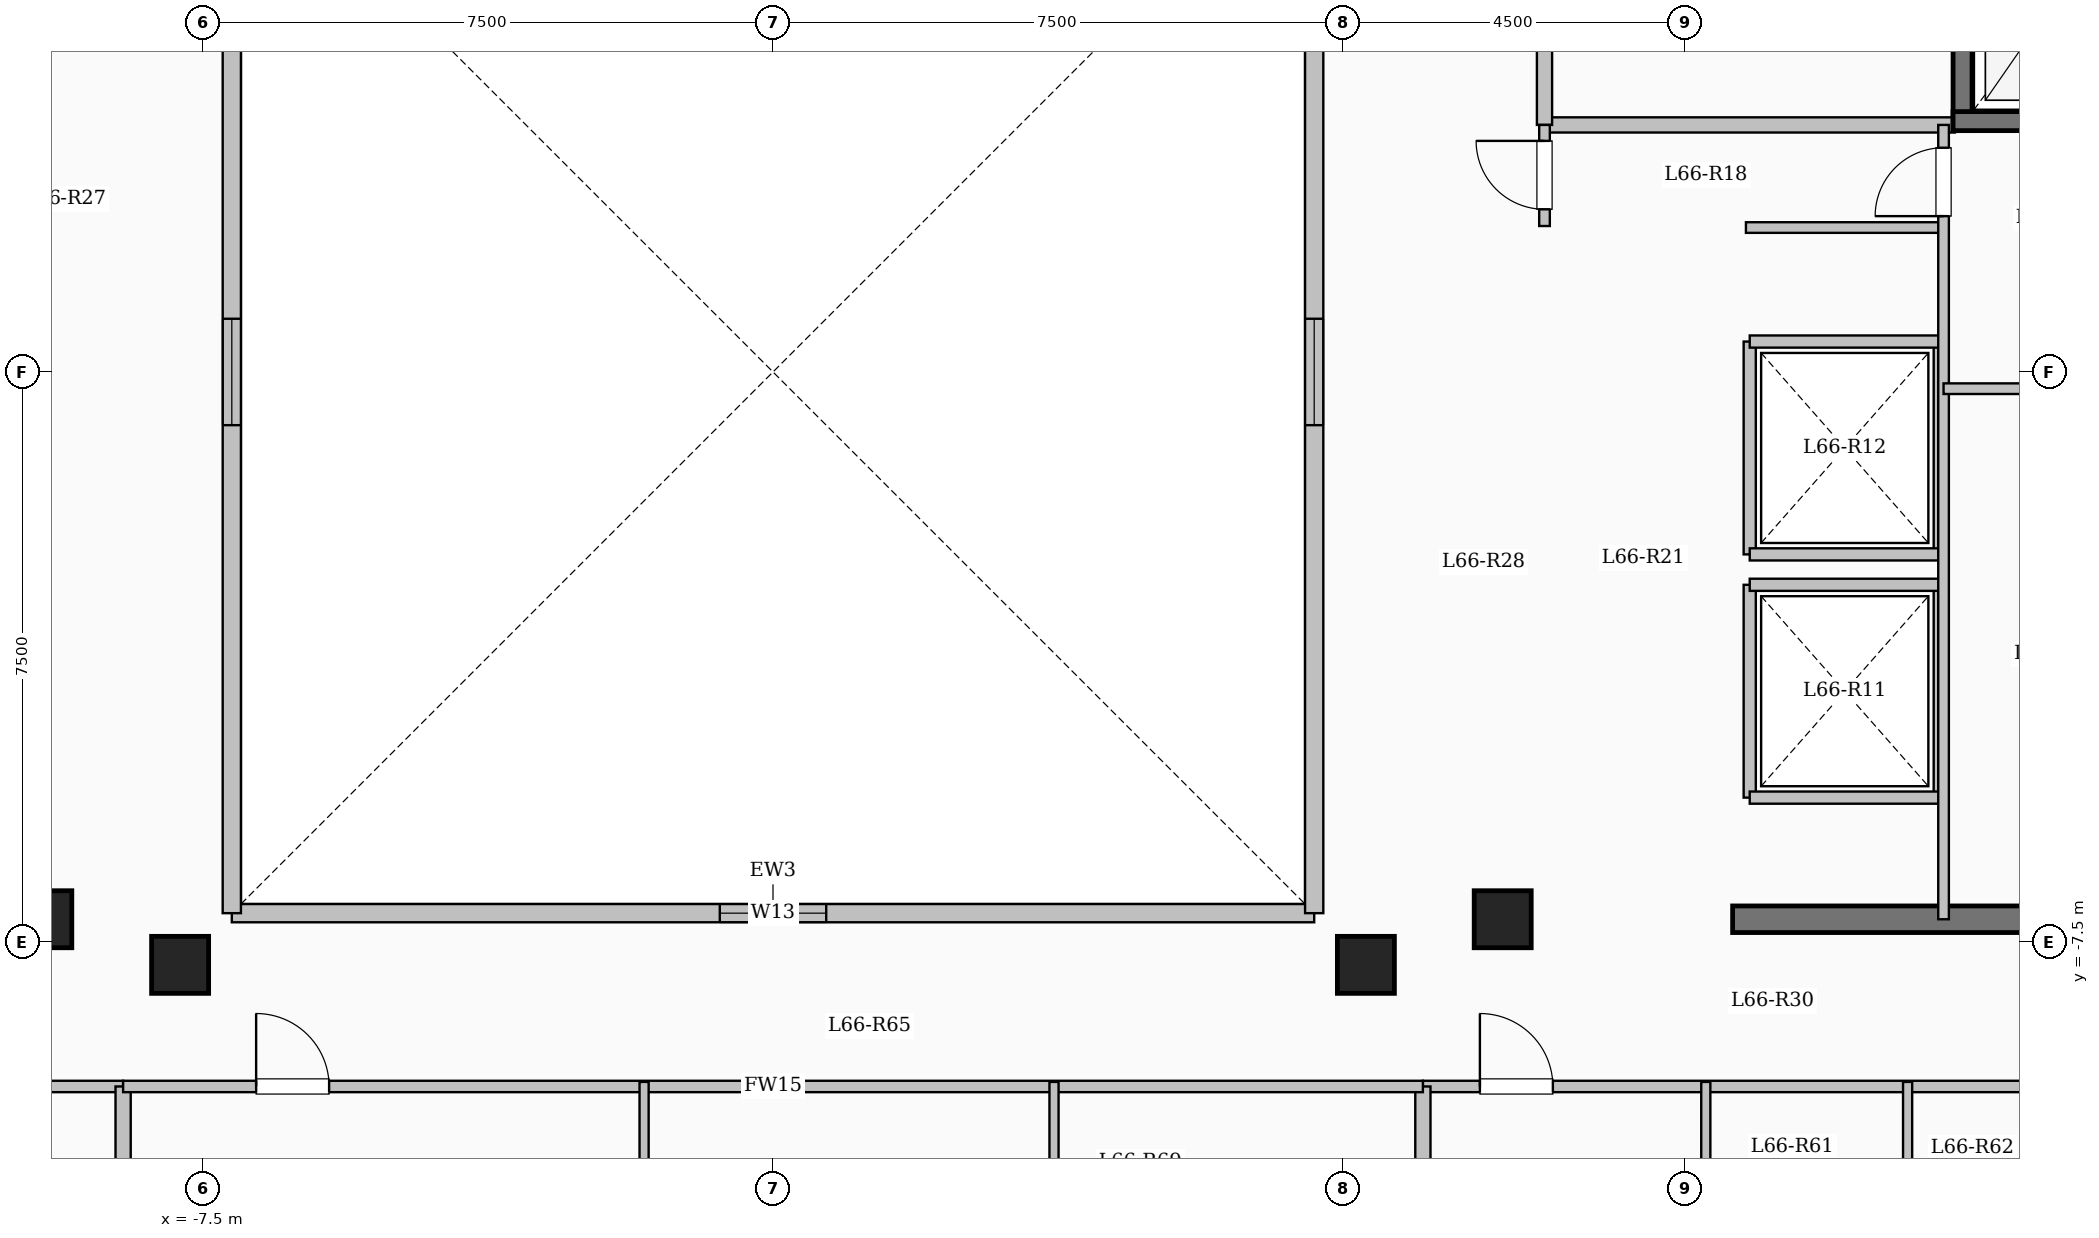
"""IFC4 building model, lengths in metres.
Left out: names, types, materials, properties, quantities, classifications, styles, units other than length and angle.
Written with IfcOpenShell. Run it as: python <this file> out.ifc"""

import sys

from ifc_helpers import new_model, si_unit, direction, frame, frame_2d, origin, origin_2d, place, context, subcontext, project, spatial, rectangle, extrude, element, fill, save


model = new_model("IFC4")
c1 = context("Model", 3, precision=1e-05, world=origin(), true_north=direction((0.0, 1.0)))
c2 = subcontext(c1, "Body", "Model", "MODEL_VIEW")
j1 = project(units=[si_unit("LENGTHUNIT", "METRE"), si_unit("PLANEANGLEUNIT", "RADIAN")], contexts=[c1])
p1 = place(None, origin())
s1 = spatial("IfcSite", under=j1, at=p1, CompositionType="ELEMENT")
p2 = place(p1, origin())
s2 = spatial("IfcBuilding", under=s1, at=p2, CompositionType="ELEMENT")
p3 = place(p2, frame((0.0, 0.0, 244.85)))
s3 = spatial("IfcBuildingStorey", under=s2, at=p3, CompositionType="ELEMENT", Elevation=244.85)
for number, where, z_axis, x_axis in (
    (1, (-7.8, -7.8, 0.0), (0.0, 0.0, 1.0), (1.0, 0.0, 0.0)),
    (2, (7.8, -7.8, 0.0), (0.0, 0.0, 1.0), (1.0, 0.0, 0.0)),
    (3, (-9.6, -7.2, 0.0), (0.0, 0.0, 1.0), (1.0, 0.0, 0.0)),
    (4, (9.6, -7.2, 0.0), (0.0, 0.0, 1.0), (1.0, 0.0, 0.0)),
):
    element("IfcColumn", number, at=place(p3, frame(where, z_axis=z_axis, x_axis=x_axis)), inside=s3, PredefinedType="COLUMN", context=c2, shape_type="SweptSolid", body=[
        extrude(rectangle(XDim=0.75, YDim=0.75, at=origin_2d()), origin(), (0.0, 0.0, 1.0), 3.35),
    ])
p4 = place(p3, frame((-7.12, -7.12, 0.0), z_axis=(0.0, 0.0, 1.0), x_axis=(1.0, 0.0, 0.0)))
e5 = element("IfcWall", 5, at=p4, inside=s3, PredefinedType="SOLIDWALL", context=c2, shape_type="SweptSolid", body=[
    extrude(rectangle(XDim=14.24, YDim=0.24, at=frame_2d((7.12, 0.0))), origin(), (0.0, 0.0, 1.0), 3.1),
])
p5 = place(p4, frame((6.42, 0.0, 0.95)))
e6 = element("IfcOpeningElement", 6, at=p5, cuts=e5, PredefinedType="OPENING", context=c2, shape_type="SweptSolid", body=[
    extrude(rectangle(XDim=1.4, YDim=1.5, at=frame_2d((0.7, 0.75))), frame((0.0, 0.13, 0.0), z_axis=(0.0, -1.0, 0.0), x_axis=(1.0, 0.0, 0.0)), (0.0, 0.0, 1.0), 0.26),
])
p6 = place(p3, frame((7.12, -7.12, 0.0), z_axis=(0.0, 0.0, 1.0), x_axis=(0.0, 1.0, 0.0)))
e7 = element("IfcWall", 7, at=p6, inside=s3, PredefinedType="SOLIDWALL", context=c2, shape_type="SweptSolid", body=[
    extrude(rectangle(XDim=14.24, YDim=0.24, at=frame_2d((7.12, 0.0))), origin(), (0.0, 0.0, 1.0), 3.1),
])
p7 = place(p6, frame((6.42, 0.0, 0.95)))
e8 = element("IfcOpeningElement", 8, at=p7, cuts=e7, PredefinedType="OPENING", context=c2, shape_type="SweptSolid", body=[
    extrude(rectangle(XDim=1.4, YDim=1.5, at=frame_2d((0.7, 0.75))), frame((0.0, 0.13, 0.0), z_axis=(0.0, -1.0, 0.0), x_axis=(1.0, 0.0, 0.0)), (0.0, 0.0, 1.0), 0.26),
])
p8 = place(p3, frame((-7.12, 7.12, 0.0), z_axis=(0.0, 0.0, 1.0), x_axis=(0.0, -1.0, 0.0)))
e9 = element("IfcWall", 9, at=p8, inside=s3, PredefinedType="SOLIDWALL", context=c2, shape_type="SweptSolid", body=[
    extrude(rectangle(XDim=14.24, YDim=0.24, at=frame_2d((7.12, 0.0))), origin(), (0.0, 0.0, 1.0), 3.1),
])
p9 = place(p8, frame((6.42, 0.0, 0.95)))
e10 = element("IfcOpeningElement", 10, at=p9, cuts=e9, PredefinedType="OPENING", context=c2, shape_type="SweptSolid", body=[
    extrude(rectangle(XDim=1.4, YDim=1.5, at=frame_2d((0.7, 0.75))), frame((0.0, 0.13, 0.0), z_axis=(0.0, -1.0, 0.0), x_axis=(1.0, 0.0, 0.0)), (0.0, 0.0, 1.0), 0.26),
])
p10 = place(p3, frame((10.15, 3.25, 0.0), z_axis=(0.0, 0.0, 1.0), x_axis=(1.0, 0.0, 0.0)))
e11 = element("IfcWall", 11, at=p10, inside=s3, PredefinedType="SOLIDWALL", context=c2, shape_type="SweptSolid", body=[
    extrude(rectangle(XDim=5.4, YDim=0.2, at=frame_2d((2.7, 0.0))), origin(), (0.0, 0.0, 1.0), 3.1),
])
p11 = place(p3, frame((10.15, 3.25, 0.0), z_axis=(0.0, 0.0, 1.0), x_axis=(0.0, 1.0, 0.0)))
e12 = element("IfcWall", 12, at=p11, inside=s3, PredefinedType="SOLIDWALL", context=c2, shape_type="SweptSolid", body=[
    extrude(rectangle(XDim=3.25, YDim=0.2, at=frame_2d((1.625, 0.0))), origin(), (0.0, 0.0, 1.0), 3.1),
])
p12 = place(p11, frame((1.1, 0.0, 0.0)))
e13 = element("IfcOpeningElement", 13, at=p12, cuts=e12, PredefinedType="OPENING", context=c2, shape_type="SweptSolid", body=[
    extrude(rectangle(XDim=1.02, YDim=2.15, at=frame_2d((0.51, 1.075))), frame((0.0, 0.11, 0.0), z_axis=(0.0, -1.0, 0.0), x_axis=(1.0, 0.0, 0.0)), (0.0, 0.0, 1.0), 0.22),
])
p13 = place(p3, frame((15.65, 3.175, 0.0), z_axis=(0.0, 0.0, 1.0), x_axis=(0.0, 1.0, 0.0)))
e14 = element("IfcWall", 14, at=p13, inside=s3, PredefinedType="SHEAR", context=c2, shape_type="SweptSolid", body=[
    extrude(rectangle(XDim=3.25, YDim=0.25, at=frame_2d((1.625, 0.0))), origin(), (0.0, 0.0, 1.0), 3.35),
])
p14 = place(p13, frame((1.075, 0.0, 0.0)))
e15 = element("IfcOpeningElement", 15, at=p14, cuts=e14, PredefinedType="OPENING", context=c2, shape_type="SweptSolid", body=[
    extrude(rectangle(XDim=1.1, YDim=2.15, at=frame_2d((0.55, 1.075))), frame((0.0, 0.135, 0.0), z_axis=(0.0, -1.0, 0.0), x_axis=(1.0, 0.0, 0.0)), (0.0, 0.0, 1.0), 0.27),
])
p15 = place(p3, frame((15.525, 3.3, 0.0), z_axis=(0.0, 0.0, 1.0), x_axis=(1.0, 0.0, 0.0)))
e16 = element("IfcWall", 16, at=p15, inside=s3, PredefinedType="SHEAR", context=c2, shape_type="SweptSolid", body=[
    extrude(rectangle(XDim=2.55, YDim=0.25, at=frame_2d((1.275, 0.0))), origin(), (0.0, 0.0, 1.0), 3.35),
])
for number, where, z_axis, x_axis in (
    (17, (12.85, -5.6, 0.0), (0.0, 0.0, 1.0), (0.0, 1.0, 0.0)),
    (18, (15.35, -5.6, 0.0), (0.0, 0.0, 1.0), (0.0, 1.0, 0.0)),
):
    element("IfcWall", number, at=place(p3, frame(where, z_axis=z_axis, x_axis=x_axis)), inside=s3, PredefinedType="SOLIDWALL", context=c2, shape_type="SweptSolid", body=[
        extrude(rectangle(XDim=2.8, YDim=0.16, at=frame_2d((1.4, 0.0))), origin(), (0.0, 0.0, 1.0), 3.1),
    ])
for number, where, z_axis, x_axis in (
    (19, (12.85, -5.6, 0.0), (0.0, 0.0, 1.0), (1.0, 0.0, 0.0)),
    (20, (12.85, -2.8, 0.0), (0.0, 0.0, 1.0), (1.0, 0.0, 0.0)),
):
    element("IfcWall", number, at=place(p3, frame(where, z_axis=z_axis, x_axis=x_axis)), inside=s3, PredefinedType="SOLIDWALL", context=c2, shape_type="SweptSolid", body=[
        extrude(rectangle(XDim=2.5, YDim=0.16, at=frame_2d((1.25, 0.0))), origin(), (0.0, 0.0, 1.0), 3.1),
    ])
for number, where, z_axis, x_axis in (
    (21, (12.85, -2.4, 0.0), (0.0, 0.0, 1.0), (0.0, 1.0, 0.0)),
    (22, (15.35, -2.4, 0.0), (0.0, 0.0, 1.0), (0.0, 1.0, 0.0)),
):
    element("IfcWall", number, at=place(p3, frame(where, z_axis=z_axis, x_axis=x_axis)), inside=s3, PredefinedType="SOLIDWALL", context=c2, shape_type="SweptSolid", body=[
        extrude(rectangle(XDim=2.8, YDim=0.16, at=frame_2d((1.4, 0.0))), origin(), (0.0, 0.0, 1.0), 3.1),
    ])
for number, where, z_axis, x_axis in (
    (23, (12.85, -2.4, 0.0), (0.0, 0.0, 1.0), (1.0, 0.0, 0.0)),
    (24, (12.85, 0.4, 0.0), (0.0, 0.0, 1.0), (1.0, 0.0, 0.0)),
):
    element("IfcWall", number, at=place(p3, frame(where, z_axis=z_axis, x_axis=x_axis)), inside=s3, PredefinedType="SOLIDWALL", context=c2, shape_type="SweptSolid", body=[
        extrude(rectangle(XDim=2.5, YDim=0.16, at=frame_2d((1.25, 0.0))), origin(), (0.0, 0.0, 1.0), 3.1),
    ])
p16 = place(p3, frame((12.625, -7.2, 0.0), z_axis=(0.0, 0.0, 1.0), x_axis=(1.0, 0.0, 0.0)))
e25 = element("IfcWall", 25, at=p16, inside=s3, PredefinedType="SHEAR", context=c2, shape_type="SweptSolid", body=[
    extrude(rectangle(XDim=6.0, YDim=0.35, at=frame_2d((3.0, 0.0))), origin(), (0.0, 0.0, 1.0), 3.35),
])
p17 = place(p3, frame((12.8, 1.9, 0.0), z_axis=(0.0, 0.0, 1.0), x_axis=(1.0, 0.0, 0.0)))
e26 = element("IfcWall", 26, at=p17, inside=s3, PredefinedType="PARTITIONING", context=c2, shape_type="SweptSolid", body=[
    extrude(rectangle(XDim=2.6, YDim=0.14, at=frame_2d((1.3, 0.0))), origin(), (0.0, 0.0, 1.0), 3.1),
])
p18 = place(p3, frame((10.15, 1.92, 0.0), z_axis=(0.0, 0.0, 1.0), x_axis=(0.0, 1.0, 0.0)))
e27 = element("IfcWall", 27, at=p18, inside=s3, PredefinedType="PARTITIONING", context=c2, shape_type="SweptSolid", body=[
    extrude(rectangle(XDim=1.33, YDim=0.14, at=frame_2d((0.665, 0.0))), origin(), (0.0, 0.0, 1.0), 3.1),
])
p19 = place(p18, frame((0.22, 0.0, 0.0)))
e28 = element("IfcOpeningElement", 28, at=p19, cuts=e27, PredefinedType="OPENING", context=c2, shape_type="SweptSolid", body=[
    extrude(rectangle(XDim=0.9, YDim=2.08, at=frame_2d((0.45, 1.04))), frame((0.0, 0.08, 0.0), z_axis=(0.0, -1.0, 0.0), x_axis=(1.0, 0.0, 0.0)), (0.0, 0.0, 1.0), 0.16),
])
p20 = place(p3, frame((15.4, -7.2, 0.0), z_axis=(0.0, 0.0, 1.0), x_axis=(0.0, 1.0, 0.0)))
e29 = element("IfcWall", 29, at=p20, inside=s3, PredefinedType="PARTITIONING", context=c2, shape_type="SweptSolid", body=[
    extrude(rectangle(XDim=10.45, YDim=0.14, at=frame_2d((5.225, 0.0))), origin(), (0.0, 0.0, 1.0), 3.1),
])
p21 = place(p20, frame((9.25, 0.0, 0.0)))
e30 = element("IfcOpeningElement", 30, at=p21, cuts=e29, PredefinedType="OPENING", context=c2, shape_type="SweptSolid", body=[
    extrude(rectangle(XDim=0.9, YDim=2.08, at=frame_2d((0.45, 1.04))), frame((0.0, 0.08, 0.0), z_axis=(0.0, -1.0, 0.0), x_axis=(1.0, 0.0, 0.0)), (0.0, 0.0, 1.0), 0.16),
])
p22 = place(p3, frame((15.4, -0.22, 0.0), z_axis=(0.0, 0.0, 1.0), x_axis=(1.0, 0.0, 0.0)))
e31 = element("IfcWall", 31, at=p22, inside=s3, PredefinedType="PARTITIONING", context=c2, shape_type="SweptSolid", body=[
    extrude(rectangle(XDim=3.05, YDim=0.14, at=frame_2d((1.525, 0.0))), origin(), (0.0, 0.0, 1.0), 3.1),
])
p23 = place(p22, frame((1.05, 0.0, 0.0)))
e32 = element("IfcOpeningElement", 32, at=p23, cuts=e31, PredefinedType="OPENING", context=c2, shape_type="SweptSolid", body=[
    extrude(rectangle(XDim=0.9, YDim=2.08, at=frame_2d((0.45, 1.04))), frame((0.0, 0.08, 0.0), z_axis=(0.0, -1.0, 0.0), x_axis=(1.0, 0.0, 0.0)), (0.0, 0.0, 1.0), 0.16),
])
p24 = place(p3, frame((-17.75, -9.4, 0.0), z_axis=(0.0, 0.0, 1.0), x_axis=(1.0, 0.0, 0.0)))
e33 = element("IfcWall", 33, at=p24, inside=s3, PredefinedType="PARTITIONING", context=c2, shape_type="SweptSolid", body=[
    extrude(rectangle(XDim=9.2, YDim=0.15, at=frame_2d((4.6, 0.0))), origin(), (0.0, 0.0, 1.0), 3.1),
])
p25 = place(p24, frame((0.7, 0.0, 0.0)))
e34 = element("IfcOpeningElement", 34, at=p25, cuts=e33, PredefinedType="OPENING", context=c2, shape_type="SweptSolid", body=[
    extrude(rectangle(XDim=0.96, YDim=2.15, at=frame_2d((0.48, 1.075))), frame((0.0, 0.085, 0.0), z_axis=(0.0, -1.0, 0.0), x_axis=(1.0, 0.0, 0.0)), (0.0, 0.0, 1.0), 0.17),
])
p26 = place(p3, frame((8.55, -9.4, 0.0), z_axis=(0.0, 0.0, 1.0), x_axis=(1.0, 0.0, 0.0)))
e35 = element("IfcWall", 35, at=p26, inside=s3, PredefinedType="PARTITIONING", context=c2, shape_type="SweptSolid", body=[
    extrude(rectangle(XDim=9.2, YDim=0.15, at=frame_2d((4.6, 0.0))), origin(), (0.0, 0.0, 1.0), 3.1),
])
p27 = place(p26, frame((0.75, 0.0, 0.0)))
e36 = element("IfcOpeningElement", 36, at=p27, cuts=e35, PredefinedType="OPENING", context=c2, shape_type="SweptSolid", body=[
    extrude(rectangle(XDim=0.96, YDim=2.15, at=frame_2d((0.48, 1.075))), frame((0.0, 0.085, 0.0), z_axis=(0.0, -1.0, 0.0), x_axis=(1.0, 0.0, 0.0)), (0.0, 0.0, 1.0), 0.17),
])
p28 = place(p3, frame((12.272, -20.9, 0.0), z_axis=(0.0, 0.0, 1.0), x_axis=(0.0, 1.0, 0.0)))
e37 = element("IfcWall", 37, at=p28, inside=s3, PredefinedType="PARTITIONING", context=c2, shape_type="SweptSolid", body=[
    extrude(rectangle(XDim=11.56, YDim=0.12, at=frame_2d((5.78, 0.0))), origin(), (0.0, 0.0, 1.0), 3.1),
])
p29 = place(p28, frame((7.395, 0.0, 0.0)))
e38 = element("IfcOpeningElement", 38, at=p29, cuts=e37, PredefinedType="OPENING", context=c2, shape_type="SweptSolid", body=[
    extrude(rectangle(XDim=1.08, YDim=2.15, at=frame_2d((0.54, 1.075))), frame((0.0, 0.07, 0.0), z_axis=(0.0, -1.0, 0.0), x_axis=(1.0, 0.0, 0.0)), (0.0, 0.0, 1.0), 0.14),
])
p30 = place(p3, frame((14.927, -12.14, 0.0), z_axis=(0.0, 0.0, 1.0), x_axis=(0.0, 1.0, 0.0)))
e39 = element("IfcWall", 39, at=p30, inside=s3, PredefinedType="PARTITIONING", context=c2, shape_type="SweptSolid", body=[
    extrude(rectangle(XDim=2.8, YDim=0.12, at=frame_2d((1.4, 0.0))), origin(), (0.0, 0.0, 1.0), 2.685),
])
for number, where, z_axis, x_axis in (
    (40, (-8.55, -21.504, 0.0), (0.0, 0.0, 1.0), (0.0, 1.0, 0.0)),
    (41, (8.55, -21.504, 0.0), (0.0, 0.0, 1.0), (0.0, 1.0, 0.0)),
):
    element("IfcWall", number, at=place(p3, frame(where, z_axis=z_axis, x_axis=x_axis)), inside=s3, PredefinedType="SOLIDWALL", context=c2, shape_type="SweptSolid", body=[
        extrude(rectangle(XDim=12.104, YDim=0.2, at=frame_2d((6.052, 0.0))), origin(), (0.0, 0.0, 1.0), 3.1),
    ])
p31 = place(p3, frame((-8.55, -9.4, 0.0), z_axis=(0.0, 0.0, 1.0), x_axis=(1.0, 0.0, 0.0)))
e42 = element("IfcWall", 42, at=p31, inside=s3, PredefinedType="PARTITIONING", context=c2, shape_type="SweptSolid", body=[
    extrude(rectangle(XDim=17.1, YDim=0.15, at=frame_2d((8.55, 0.0))), origin(), (0.0, 0.0, 1.0), 3.1),
])
p32 = place(p31, frame((1.75, 0.0, 0.0)))
e43 = element("IfcOpeningElement", 43, at=p32, cuts=e42, PredefinedType="OPENING", context=c2, shape_type="SweptSolid", body=[
    extrude(rectangle(XDim=0.96, YDim=2.15, at=frame_2d((0.48, 1.075))), frame((0.0, 0.085, 0.0), z_axis=(0.0, -1.0, 0.0), x_axis=(1.0, 0.0, 0.0)), (0.0, 0.0, 1.0), 0.17),
])
p33 = place(p3, frame((-1.696, -22.38, 0.0), z_axis=(0.0, 0.0, 1.0), x_axis=(0.0, 1.0, 0.0)))
e44 = element("IfcWall", 44, at=p33, inside=s3, PredefinedType="PARTITIONING", context=c2, shape_type="SweptSolid", body=[
    extrude(rectangle(XDim=13.04, YDim=0.12, at=frame_2d((6.52, 0.0))), origin(), (0.0, 0.0, 1.0), 3.1),
])
p34 = place(p33, frame((8.705, 0.0, 0.0)))
e45 = element("IfcOpeningElement", 45, at=p34, cuts=e44, PredefinedType="OPENING", context=c2, shape_type="SweptSolid", body=[
    extrude(rectangle(XDim=1.08, YDim=2.15, at=frame_2d((0.54, 1.075))), frame((0.0, 0.07, 0.0), z_axis=(0.0, -1.0, 0.0), x_axis=(1.0, 0.0, 0.0)), (0.0, 0.0, 1.0), 0.14),
])
p35 = place(p3, frame((3.697, -12.31, 0.0), z_axis=(0.0, 0.0, 1.0), x_axis=(0.0, 1.0, 0.0)))
e46 = element("IfcWall", 46, at=p35, inside=s3, PredefinedType="PARTITIONING", context=c2, shape_type="SweptSolid", body=[
    extrude(rectangle(XDim=2.97, YDim=0.12, at=frame_2d((1.485, 0.0))), origin(), (0.0, 0.0, 1.0), 3.1),
])
p36 = place(p5, origin())
e47 = element("IfcWindow", 47, at=p36, inside=s3, PartitioningType="SINGLE_PANEL", PredefinedType="WINDOW", context=c2, shape_type="SweptSolid", body=[
    extrude(rectangle(XDim=1.4, YDim=1.5, at=frame_2d((0.7, 0.75))), frame((0.0, 0.03, 0.0), z_axis=(0.0, -1.0, 0.0), x_axis=(1.0, 0.0, 0.0)), (0.0, 0.0, 1.0), 0.06),
])
fill(e6, e47)
p37 = place(p7, origin())
e48 = element("IfcWindow", 48, at=p37, inside=s3, PartitioningType="SINGLE_PANEL", PredefinedType="WINDOW", context=c2, shape_type="SweptSolid", body=[
    extrude(rectangle(XDim=1.4, YDim=1.5, at=frame_2d((0.7, 0.75))), frame((0.0, 0.03, 0.0), z_axis=(0.0, -1.0, 0.0), x_axis=(1.0, 0.0, 0.0)), (0.0, 0.0, 1.0), 0.06),
])
fill(e8, e48)
p38 = place(p9, origin())
e49 = element("IfcWindow", 49, at=p38, inside=s3, PartitioningType="SINGLE_PANEL", PredefinedType="WINDOW", context=c2, shape_type="SweptSolid", body=[
    extrude(rectangle(XDim=1.4, YDim=1.5, at=frame_2d((0.7, 0.75))), frame((0.0, 0.03, 0.0), z_axis=(0.0, -1.0, 0.0), x_axis=(1.0, 0.0, 0.0)), (0.0, 0.0, 1.0), 0.06),
])
fill(e10, e49)
p39 = place(p19, origin())
e50 = element("IfcDoor", 50, at=p39, inside=s3, OperationType="SINGLE_SWING_RIGHT", PredefinedType="DOOR", context=c2, shape_type="SweptSolid", body=[
    extrude(rectangle(XDim=0.9, YDim=2.08, at=frame_2d((0.45, 1.04))), frame((0.0, 0.025, 0.0), z_axis=(0.0, -1.0, 0.0), x_axis=(1.0, 0.0, 0.0)), (0.0, 0.0, 1.0), 0.05),
])
fill(e28, e50)
p40 = place(p21, origin())
e51 = element("IfcDoor", 51, at=p40, inside=s3, OperationType="SINGLE_SWING_LEFT", PredefinedType="DOOR", context=c2, shape_type="SweptSolid", body=[
    extrude(rectangle(XDim=0.9, YDim=2.08, at=frame_2d((0.45, 1.04))), frame((0.0, 0.025, 0.0), z_axis=(0.0, -1.0, 0.0), x_axis=(1.0, 0.0, 0.0)), (0.0, 0.0, 1.0), 0.05),
])
fill(e30, e51)
p41 = place(p27, origin())
e52 = element("IfcDoor", 52, at=p41, inside=s3, OperationType="SINGLE_SWING_LEFT", PredefinedType="DOOR", context=c2, shape_type="SweptSolid", body=[
    extrude(rectangle(XDim=0.96, YDim=2.15, at=frame_2d((0.48, 1.075))), frame((0.0, 0.025, 0.0), z_axis=(0.0, -1.0, 0.0), x_axis=(1.0, 0.0, 0.0)), (0.0, 0.0, 1.0), 0.05),
])
fill(e36, e52)
p42 = place(p32, origin())
e53 = element("IfcDoor", 53, at=p42, inside=s3, OperationType="SINGLE_SWING_LEFT", PredefinedType="DOOR", context=c2, shape_type="SweptSolid", body=[
    extrude(rectangle(XDim=0.96, YDim=2.15, at=frame_2d((0.48, 1.075))), frame((0.0, 0.025, 0.0), z_axis=(0.0, -1.0, 0.0), x_axis=(1.0, 0.0, 0.0)), (0.0, 0.0, 1.0), 0.05),
])
fill(e43, e53)
save(model, sys.argv[1])
